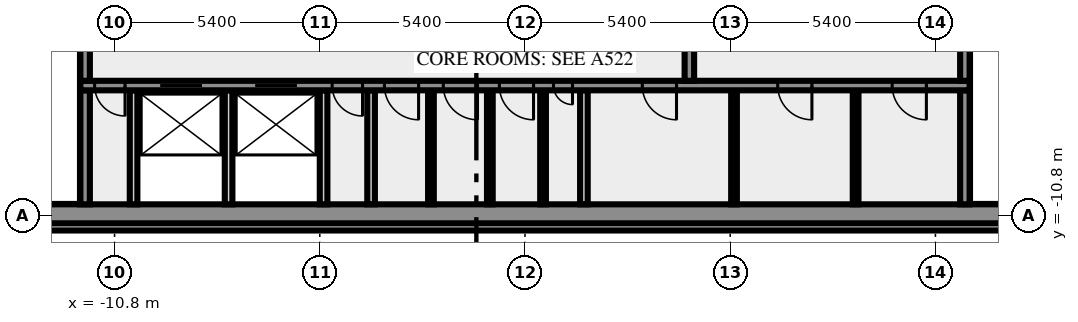
"""IFC4 building model, lengths in metres.
Left out: names, types, materials, properties, quantities, classifications, styles, units other than length and angle.
Written with IfcOpenShell. Run it as: python <this file> out.ifc"""

import sys

from ifc_helpers import new_model, si_unit, direction, frame, frame_2d, origin, place, context, subcontext, project, spatial, rectangle, extrude, element, fill, save


model = new_model("IFC4")
c1 = context("Model", 3, precision=1e-05, world=origin(), true_north=direction((0.0, 1.0)))
c2 = subcontext(c1, "Body", "Model", "MODEL_VIEW")
j1 = project(units=[si_unit("LENGTHUNIT", "METRE"), si_unit("PLANEANGLEUNIT", "RADIAN")], contexts=[c1])
p1 = place(None, origin())
s1 = spatial("IfcSite", under=j1, at=p1, CompositionType="ELEMENT")
p2 = place(p1, origin())
s2 = spatial("IfcBuilding", under=s1, at=p2, CompositionType="ELEMENT")
p3 = place(p2, frame((0.0, 0.0, 327.0)))
s3 = spatial("IfcBuildingStorey", under=s2, at=p3, CompositionType="ELEMENT", Elevation=327.0)
p4 = place(p3, frame((-17.444, -11.088, 0.0), z_axis=(0.0, 0.0, 1.0), x_axis=(1.0, 0.0, 0.0)))
e1 = element("IfcWall", 1, at=p4, inside=s3, PredefinedType="SOLIDWALL", context=c2, shape_type="SweptSolid", body=[
    extrude(rectangle(XDim=34.888, YDim=0.2, at=frame_2d((17.444, 0.0))), origin(), (0.0, 0.0, 1.0), 3.65),
])
p5 = place(p3, frame((-20.0, -10.75, 0.0), z_axis=(0.0, 0.0, 1.0), x_axis=(1.0, 0.0, 0.0)))
e2 = element("IfcWall", 2, at=p5, inside=s3, PredefinedType="SHEAR", context=c2, shape_type="SweptSolid", body=[
    extrude(rectangle(XDim=40.0, YDim=0.5, at=frame_2d((20.0, 0.0))), origin(), (0.0, 0.0, 1.0), 3.65),
])
p6 = place(p5, frame((0.8, 0.0, 1.0)))
e3 = element("IfcOpeningElement", 3, at=p6, cuts=e2, PredefinedType="OPENING", context=c2, shape_type="SweptSolid", body=[
    extrude(rectangle(XDim=1.2, YDim=1.2, at=frame_2d((0.6, 0.6))), frame((0.0, 0.26, 0.0), z_axis=(0.0, -1.0, 0.0), x_axis=(1.0, 0.0, 0.0)), (0.0, 0.0, 1.0), 0.52),
])
p7 = place(p5, frame((38.0, 0.0, 1.0)))
e4 = element("IfcOpeningElement", 4, at=p7, cuts=e2, PredefinedType="OPENING", context=c2, shape_type="SweptSolid", body=[
    extrude(rectangle(XDim=1.2, YDim=1.2, at=frame_2d((0.6, 0.6))), frame((0.0, 0.26, 0.0), z_axis=(0.0, -1.0, 0.0), x_axis=(1.0, 0.0, 0.0)), (0.0, 0.0, 1.0), 0.52),
])
p8 = place(p3, frame((-11.575, -10.5, 0.0), z_axis=(0.0, 0.0, 1.0), x_axis=(0.0, 1.0, 0.0)))
e5 = element("IfcWall", 5, at=p8, inside=s3, PredefinedType="SHEAR", context=c2, shape_type="SweptSolid", body=[
    extrude(rectangle(XDim=3.0, YDim=0.25, at=frame_2d((1.5, 0.0))), origin(), (0.0, 0.0, 1.0), 3.65),
])
for number, where, z_axis, x_axis in (
    (6, (-10.3, -10.5, 0.0), (0.0, 0.0, 1.0), (0.0, 1.0, 0.0)),
    (7, (-7.8, -10.5, 0.0), (0.0, 0.0, 1.0), (0.0, 1.0, 0.0)),
    (8, (-5.3, -10.5, 0.0), (0.0, 0.0, 1.0), (0.0, 1.0, 0.0)),
    (9, (-4.05, -10.5, 0.0), (0.0, 0.0, 1.0), (0.0, 1.0, 0.0)),
):
    element("IfcWall", number, at=place(p3, frame(where, z_axis=z_axis, x_axis=x_axis)), inside=s3, PredefinedType="SOLIDWALL", context=c2, shape_type="SweptSolid", body=[
        extrude(rectangle(XDim=3.0, YDim=0.2, at=frame_2d((1.5, 0.0))), origin(), (0.0, 0.0, 1.0), 3.65),
    ])
for number, where, z_axis, x_axis in (
    (10, (-2.475, -10.5, 0.0), (0.0, 0.0, 1.0), (0.0, 1.0, 0.0)),
    (11, (-0.925, -10.5, 0.0), (0.0, 0.0, 1.0), (0.0, 1.0, 0.0)),
    (12, (0.475, -10.5, 0.0), (0.0, 0.0, 1.0), (0.0, 1.0, 0.0)),
):
    element("IfcWall", number, at=place(p3, frame(where, z_axis=z_axis, x_axis=x_axis)), inside=s3, PredefinedType="PARTITIONING", context=c2, shape_type="SweptSolid", body=[
        extrude(rectangle(XDim=3.0, YDim=0.15, at=frame_2d((1.5, 0.0))), origin(), (0.0, 0.0, 1.0), 3.65),
    ])
p9 = place(p3, frame((1.55, -10.5, 0.0), z_axis=(0.0, 0.0, 1.0), x_axis=(0.0, 1.0, 0.0)))
e13 = element("IfcWall", 13, at=p9, inside=s3, PredefinedType="SOLIDWALL", context=c2, shape_type="SweptSolid", body=[
    extrude(rectangle(XDim=3.0, YDim=0.2, at=frame_2d((1.5, 0.0))), origin(), (0.0, 0.0, 1.0), 3.65),
])
for number, where, z_axis, x_axis in (
    (14, (5.5, -10.5, 0.0), (0.0, 0.0, 1.0), (0.0, 1.0, 0.0)),
    (15, (8.7, -10.5, 0.0), (0.0, 0.0, 1.0), (0.0, 1.0, 0.0)),
):
    element("IfcWall", number, at=place(p3, frame(where, z_axis=z_axis, x_axis=x_axis)), inside=s3, PredefinedType="PARTITIONING", context=c2, shape_type="SweptSolid", body=[
        extrude(rectangle(XDim=3.0, YDim=0.15, at=frame_2d((1.5, 0.0))), origin(), (0.0, 0.0, 1.0), 3.65),
    ])
p10 = place(p3, frame((11.575, -10.5, 0.0), z_axis=(0.0, 0.0, 1.0), x_axis=(0.0, 1.0, 0.0)))
e16 = element("IfcWall", 16, at=p10, inside=s3, PredefinedType="SHEAR", context=c2, shape_type="SweptSolid", body=[
    extrude(rectangle(XDim=3.0, YDim=0.25, at=frame_2d((1.5, 0.0))), origin(), (0.0, 0.0, 1.0), 3.65),
])
p11 = place(p3, frame((11.7, -7.375, 0.0), z_axis=(0.0, 0.0, 1.0), x_axis=(-1.0, 0.0, 0.0)))
e17 = element("IfcWall", 17, at=p11, inside=s3, PredefinedType="SHEAR", context=c2, shape_type="SweptSolid", body=[
    extrude(rectangle(XDim=23.4, YDim=0.25, at=frame_2d((11.7, 0.0))), origin(), (0.0, 0.0, 1.0), 3.65),
])
p12 = place(p11, frame((22.225, 0.0, 0.0)))
e18 = element("IfcOpeningElement", 18, at=p12, cuts=e17, PredefinedType="OPENING", context=c2, shape_type="SweptSolid", body=[
    extrude(rectangle(XDim=0.8, YDim=2.1, at=frame_2d((0.4, 1.05))), frame((0.0, 0.135, 0.0), z_axis=(0.0, -1.0, 0.0), x_axis=(1.0, 0.0, 0.0)), (0.0, 0.0, 1.0), 0.27),
])
p13 = place(p11, frame((20.2, 0.0, 0.0)))
e19 = element("IfcOpeningElement", 19, at=p13, cuts=e17, PredefinedType="OPENING", context=c2, shape_type="SweptSolid", body=[
    extrude(rectangle(XDim=1.1, YDim=2.1, at=frame_2d((0.55, 1.05))), frame((0.0, 0.135, 0.0), z_axis=(0.0, -1.0, 0.0), x_axis=(1.0, 0.0, 0.0)), (0.0, 0.0, 1.0), 0.27),
])
p14 = place(p11, frame((17.7, 0.0, 0.0)))
e20 = element("IfcOpeningElement", 20, at=p14, cuts=e17, PredefinedType="OPENING", context=c2, shape_type="SweptSolid", body=[
    extrude(rectangle(XDim=1.1, YDim=2.1, at=frame_2d((0.55, 1.05))), frame((0.0, 0.135, 0.0), z_axis=(0.0, -1.0, 0.0), x_axis=(1.0, 0.0, 0.0)), (0.0, 0.0, 1.0), 0.27),
])
p15 = place(p11, frame((15.975, 0.0, 0.0)))
e21 = element("IfcOpeningElement", 21, at=p15, cuts=e17, PredefinedType="OPENING", context=c2, shape_type="SweptSolid", body=[
    extrude(rectangle(XDim=0.8, YDim=2.1, at=frame_2d((0.4, 1.05))), frame((0.0, 0.135, 0.0), z_axis=(0.0, -1.0, 0.0), x_axis=(1.0, 0.0, 0.0)), (0.0, 0.0, 1.0), 0.27),
])
p16 = place(p11, frame((14.5, 0.0, 0.0)))
e22 = element("IfcOpeningElement", 22, at=p16, cuts=e17, PredefinedType="OPENING", context=c2, shape_type="SweptSolid", body=[
    extrude(rectangle(XDim=0.9, YDim=2.1, at=frame_2d((0.45, 1.05))), frame((0.0, 0.135, 0.0), z_axis=(0.0, -1.0, 0.0), x_axis=(1.0, 0.0, 0.0)), (0.0, 0.0, 1.0), 0.27),
])
p17 = place(p11, frame((12.95, 0.0, 0.0)))
e23 = element("IfcOpeningElement", 23, at=p17, cuts=e17, PredefinedType="OPENING", context=c2, shape_type="SweptSolid", body=[
    extrude(rectangle(XDim=0.9, YDim=2.1, at=frame_2d((0.45, 1.05))), frame((0.0, 0.135, 0.0), z_axis=(0.0, -1.0, 0.0), x_axis=(1.0, 0.0, 0.0)), (0.0, 0.0, 1.0), 0.27),
])
p18 = place(p11, frame((11.475, 0.0, 0.0)))
e24 = element("IfcOpeningElement", 24, at=p18, cuts=e17, PredefinedType="OPENING", context=c2, shape_type="SweptSolid", body=[
    extrude(rectangle(XDim=0.9, YDim=2.1, at=frame_2d((0.45, 1.05))), frame((0.0, 0.135, 0.0), z_axis=(0.0, -1.0, 0.0), x_axis=(1.0, 0.0, 0.0)), (0.0, 0.0, 1.0), 0.27),
])
p19 = place(p11, frame((10.45, 0.0, 0.0)))
e25 = element("IfcOpeningElement", 25, at=p19, cuts=e17, PredefinedType="OPENING", context=c2, shape_type="SweptSolid", body=[
    extrude(rectangle(XDim=0.5, YDim=2.1, at=frame_2d((0.25, 1.05))), frame((0.0, 0.135, 0.0), z_axis=(0.0, -1.0, 0.0), x_axis=(1.0, 0.0, 0.0)), (0.0, 0.0, 1.0), 0.27),
])
p20 = place(p11, frame((7.713, 0.0, 0.0)))
e26 = element("IfcOpeningElement", 26, at=p20, cuts=e17, PredefinedType="OPENING", context=c2, shape_type="SweptSolid", body=[
    extrude(rectangle(XDim=0.9, YDim=2.1, at=frame_2d((0.45, 1.05))), frame((0.0, 0.135, 0.0), z_axis=(0.0, -1.0, 0.0), x_axis=(1.0, 0.0, 0.0)), (0.0, 0.0, 1.0), 0.27),
])
p21 = place(p11, frame((4.15, 0.0, 0.0)))
e27 = element("IfcOpeningElement", 27, at=p21, cuts=e17, PredefinedType="OPENING", context=c2, shape_type="SweptSolid", body=[
    extrude(rectangle(XDim=0.9, YDim=2.1, at=frame_2d((0.45, 1.05))), frame((0.0, 0.135, 0.0), z_axis=(0.0, -1.0, 0.0), x_axis=(1.0, 0.0, 0.0)), (0.0, 0.0, 1.0), 0.27),
])
p22 = place(p11, frame((1.138, 0.0, 0.0)))
e28 = element("IfcOpeningElement", 28, at=p22, cuts=e17, PredefinedType="OPENING", context=c2, shape_type="SweptSolid", body=[
    extrude(rectangle(XDim=0.9, YDim=2.1, at=frame_2d((0.45, 1.05))), frame((0.0, 0.135, 0.0), z_axis=(0.0, -1.0, 0.0), x_axis=(1.0, 0.0, 0.0)), (0.0, 0.0, 1.0), 0.27),
])
p23 = place(p3, frame((-11.575, -7.25, 0.0), z_axis=(0.0, 0.0, 1.0), x_axis=(0.0, 1.0, 0.0)))
e29 = element("IfcWall", 29, at=p23, inside=s3, PredefinedType="SHEAR", context=c2, shape_type="SweptSolid", body=[
    extrude(rectangle(XDim=1.0, YDim=0.25, at=frame_2d((0.5, 0.0))), origin(), (0.0, 0.0, 1.0), 3.65),
])
p24 = place(p3, frame((4.325, -7.25, 0.0), z_axis=(0.0, 0.0, 1.0), x_axis=(0.0, 1.0, 0.0)))
e30 = element("IfcWall", 30, at=p24, inside=s3, PredefinedType="SHEAR", context=c2, shape_type="SweptSolid", body=[
    extrude(rectangle(XDim=3.0, YDim=0.25, at=frame_2d((1.5, 0.0))), origin(), (0.0, 0.0, 1.0), 3.65),
])
p25 = place(p24, frame((0.8, 0.0, 0.0)))
e31 = element("IfcOpeningElement", 31, at=p25, cuts=e30, PredefinedType="OPENING", context=c2, shape_type="SweptSolid", body=[
    extrude(rectangle(XDim=1.4, YDim=2.1, at=frame_2d((0.7, 1.05))), frame((0.0, 0.135, 0.0), z_axis=(0.0, -1.0, 0.0), x_axis=(1.0, 0.0, 0.0)), (0.0, 0.0, 1.0), 0.27),
])
p26 = place(p3, frame((11.575, -7.25, 0.0), z_axis=(0.0, 0.0, 1.0), x_axis=(0.0, 1.0, 0.0)))
e32 = element("IfcWall", 32, at=p26, inside=s3, PredefinedType="SHEAR", context=c2, shape_type="SweptSolid", body=[
    extrude(rectangle(XDim=1.0, YDim=0.25, at=frame_2d((0.5, 0.0))), origin(), (0.0, 0.0, 1.0), 3.65),
])
p27 = place(p12, origin())
e33 = element("IfcDoor", 33, at=p27, inside=s3, OperationType="SINGLE_SWING_RIGHT", PredefinedType="DOOR", context=c2, shape_type="SweptSolid", body=[
    extrude(rectangle(XDim=0.8, YDim=2.1, at=frame_2d((0.4, 1.05))), frame((0.0, 0.025, 0.0), z_axis=(0.0, -1.0, 0.0), x_axis=(1.0, 0.0, 0.0)), (0.0, 0.0, 1.0), 0.05),
])
fill(e18, e33)
p28 = place(p13, origin())
e34 = element("IfcDoor", 34, at=p28, inside=s3, OperationType="DOUBLE_DOOR_SLIDING", PredefinedType="DOOR", context=c2, shape_type="SweptSolid", body=[
    extrude(rectangle(XDim=1.1, YDim=2.1, at=frame_2d((0.55, 1.05))), frame((0.0, 0.025, 0.0), z_axis=(0.0, -1.0, 0.0), x_axis=(1.0, 0.0, 0.0)), (0.0, 0.0, 1.0), 0.05),
])
fill(e19, e34)
p29 = place(p14, origin())
e35 = element("IfcDoor", 35, at=p29, inside=s3, OperationType="DOUBLE_DOOR_SLIDING", PredefinedType="DOOR", context=c2, shape_type="SweptSolid", body=[
    extrude(rectangle(XDim=1.1, YDim=2.1, at=frame_2d((0.55, 1.05))), frame((0.0, 0.025, 0.0), z_axis=(0.0, -1.0, 0.0), x_axis=(1.0, 0.0, 0.0)), (0.0, 0.0, 1.0), 0.05),
])
fill(e20, e35)
p30 = place(p15, origin())
e36 = element("IfcDoor", 36, at=p30, inside=s3, OperationType="SINGLE_SWING_RIGHT", PredefinedType="DOOR", context=c2, shape_type="SweptSolid", body=[
    extrude(rectangle(XDim=0.8, YDim=2.1, at=frame_2d((0.4, 1.05))), frame((0.0, 0.025, 0.0), z_axis=(0.0, -1.0, 0.0), x_axis=(1.0, 0.0, 0.0)), (0.0, 0.0, 1.0), 0.05),
])
fill(e21, e36)
p31 = place(p16, origin())
e37 = element("IfcDoor", 37, at=p31, inside=s3, OperationType="SINGLE_SWING_RIGHT", PredefinedType="DOOR", context=c2, shape_type="SweptSolid", body=[
    extrude(rectangle(XDim=0.9, YDim=2.1, at=frame_2d((0.45, 1.05))), frame((0.0, 0.025, 0.0), z_axis=(0.0, -1.0, 0.0), x_axis=(1.0, 0.0, 0.0)), (0.0, 0.0, 1.0), 0.05),
])
fill(e22, e37)
p32 = place(p17, origin())
e38 = element("IfcDoor", 38, at=p32, inside=s3, OperationType="SINGLE_SWING_RIGHT", PredefinedType="DOOR", context=c2, shape_type="SweptSolid", body=[
    extrude(rectangle(XDim=0.9, YDim=2.1, at=frame_2d((0.45, 1.05))), frame((0.0, 0.025, 0.0), z_axis=(0.0, -1.0, 0.0), x_axis=(1.0, 0.0, 0.0)), (0.0, 0.0, 1.0), 0.05),
])
fill(e23, e38)
p33 = place(p18, origin())
e39 = element("IfcDoor", 39, at=p33, inside=s3, OperationType="SINGLE_SWING_RIGHT", PredefinedType="DOOR", context=c2, shape_type="SweptSolid", body=[
    extrude(rectangle(XDim=0.9, YDim=2.1, at=frame_2d((0.45, 1.05))), frame((0.0, 0.025, 0.0), z_axis=(0.0, -1.0, 0.0), x_axis=(1.0, 0.0, 0.0)), (0.0, 0.0, 1.0), 0.05),
])
fill(e24, e39)
p34 = place(p19, origin())
e40 = element("IfcDoor", 40, at=p34, inside=s3, OperationType="SINGLE_SWING_LEFT", PredefinedType="DOOR", context=c2, shape_type="SweptSolid", body=[
    extrude(rectangle(XDim=0.5, YDim=2.1, at=frame_2d((0.25, 1.05))), frame((0.0, 0.025, 0.0), z_axis=(0.0, -1.0, 0.0), x_axis=(1.0, 0.0, 0.0)), (0.0, 0.0, 1.0), 0.05),
])
fill(e25, e40)
p35 = place(p20, origin())
e41 = element("IfcDoor", 41, at=p35, inside=s3, OperationType="SINGLE_SWING_LEFT", PredefinedType="DOOR", context=c2, shape_type="SweptSolid", body=[
    extrude(rectangle(XDim=0.9, YDim=2.1, at=frame_2d((0.45, 1.05))), frame((0.0, 0.025, 0.0), z_axis=(0.0, -1.0, 0.0), x_axis=(1.0, 0.0, 0.0)), (0.0, 0.0, 1.0), 0.05),
])
fill(e26, e41)
p36 = place(p21, origin())
e42 = element("IfcDoor", 42, at=p36, inside=s3, OperationType="SINGLE_SWING_LEFT", PredefinedType="DOOR", context=c2, shape_type="SweptSolid", body=[
    extrude(rectangle(XDim=0.9, YDim=2.1, at=frame_2d((0.45, 1.05))), frame((0.0, 0.025, 0.0), z_axis=(0.0, -1.0, 0.0), x_axis=(1.0, 0.0, 0.0)), (0.0, 0.0, 1.0), 0.05),
])
fill(e27, e42)
p37 = place(p22, origin())
e43 = element("IfcDoor", 43, at=p37, inside=s3, OperationType="SINGLE_SWING_LEFT", PredefinedType="DOOR", context=c2, shape_type="SweptSolid", body=[
    extrude(rectangle(XDim=0.9, YDim=2.1, at=frame_2d((0.45, 1.05))), frame((0.0, 0.025, 0.0), z_axis=(0.0, -1.0, 0.0), x_axis=(1.0, 0.0, 0.0)), (0.0, 0.0, 1.0), 0.05),
])
fill(e28, e43)
save(model, sys.argv[1])
